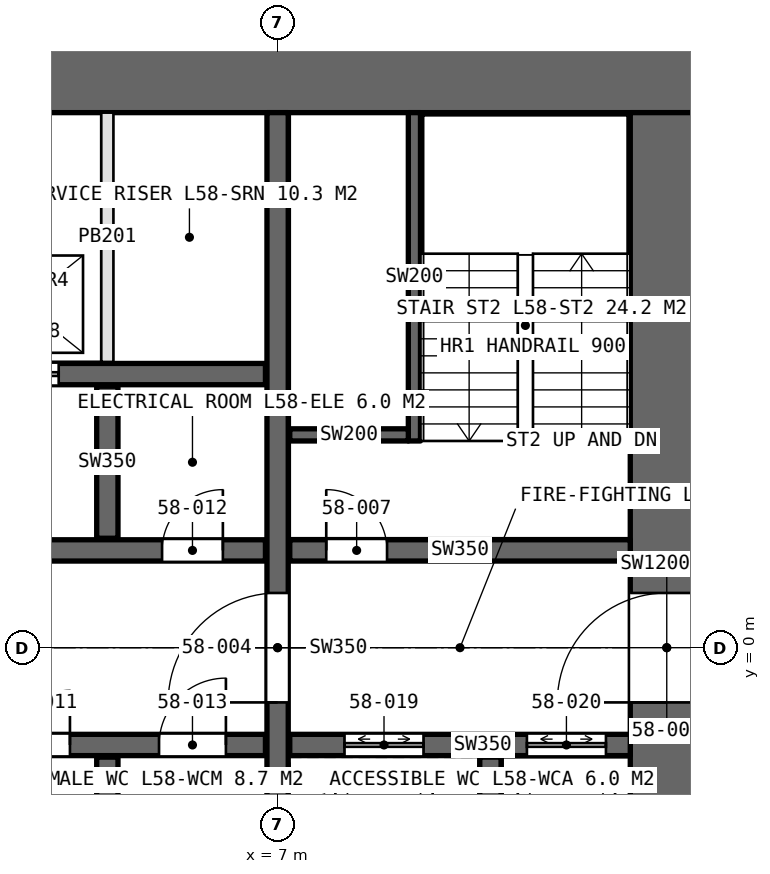
"""IFC4 building model, lengths in metres.
Left out: names, types, materials, properties, quantities, classifications, styles, units other than length and angle.
Written with IfcOpenShell. Run it as: python <this file> out.ifc"""

import sys

from ifc_helpers import new_model, si_unit, direction, frame, frame_2d, origin, place, context, subcontext, project, spatial, rectangle, extrude, element, fill, save


model = new_model("IFC4")
c1 = context("Model", 3, precision=1e-05, world=origin(), true_north=direction((0.0, 1.0)))
c2 = subcontext(c1, "Body", "Model", "MODEL_VIEW")
j1 = project(units=[si_unit("LENGTHUNIT", "METRE"), si_unit("PLANEANGLEUNIT", "RADIAN")], contexts=[c1])
p1 = place(None, origin())
s1 = spatial("IfcSite", under=j1, at=p1, CompositionType="ELEMENT")
p2 = place(p1, origin())
s2 = spatial("IfcBuilding", under=s1, at=p2, CompositionType="ELEMENT")
p3 = place(p2, frame((0.0, 0.0, 262.0)))
s3 = spatial("IfcBuildingStorey", under=s2, at=p3, CompositionType="ELEMENT", Elevation=262.0)
p4 = place(p3, frame((14.0, 9.4, 0.0), z_axis=(0.0, 0.0, 1.0), x_axis=(-1.0, 0.0, 0.0)))
e1 = element("IfcWall", 1, at=p4, inside=s3, PredefinedType="SHEAR", context=c2, shape_type="SweptSolid", body=[
    extrude(rectangle(XDim=28.0, YDim=1.2, at=frame_2d((14.0, 0.0))), origin(), (0.0, 0.0, 1.0), 4.2),
])
p5 = place(p4, frame((24.0, 0.0, 0.0)))
e2 = element("IfcOpeningElement", 2, at=p5, cuts=e1, PredefinedType="OPENING", context=c2, shape_type="SweptSolid", body=[
    extrude(rectangle(XDim=1.0, YDim=2.4, at=frame_2d((0.5, 1.2))), frame((0.0, 0.61, 0.0), z_axis=(0.0, -1.0, 0.0), x_axis=(1.0, 0.0, 0.0)), (0.0, 0.0, 1.0), 1.22),
])
p6 = place(p3, frame((13.4, -8.8, 0.0), z_axis=(0.0, 0.0, 1.0), x_axis=(0.0, 1.0, 0.0)))
e3 = element("IfcWall", 3, at=p6, inside=s3, PredefinedType="SHEAR", context=c2, shape_type="SweptSolid", body=[
    extrude(rectangle(XDim=17.6, YDim=1.2, at=frame_2d((8.8, 0.0))), origin(), (0.0, 0.0, 1.0), 4.2),
])
p7 = place(p6, frame((7.9, 0.0, 0.0)))
e4 = element("IfcOpeningElement", 4, at=p7, cuts=e3, PredefinedType="OPENING", context=c2, shape_type="SweptSolid", body=[
    extrude(rectangle(XDim=1.8, YDim=2.4, at=frame_2d((0.9, 1.2))), frame((0.0, 0.61, 0.0), z_axis=(0.0, -1.0, 0.0), x_axis=(1.0, 0.0, 0.0)), (0.0, 0.0, 1.0), 1.22),
])
p8 = place(p3, frame((7.0, -8.8, 0.0), z_axis=(0.0, 0.0, 1.0), x_axis=(0.0, 1.0, 0.0)))
e5 = element("IfcWall", 5, at=p8, inside=s3, PredefinedType="SHEAR", context=c2, shape_type="SweptSolid", body=[
    extrude(rectangle(XDim=17.6, YDim=0.35, at=frame_2d((8.8, 0.0))), origin(), (0.0, 0.0, 1.0), 4.2),
])
p9 = place(p8, frame((7.9, 0.0, 0.0)))
e6 = element("IfcOpeningElement", 6, at=p9, cuts=e5, PredefinedType="OPENING", context=c2, shape_type="SweptSolid", body=[
    extrude(rectangle(XDim=1.8, YDim=2.4, at=frame_2d((0.9, 1.2))), frame((0.0, 0.185, 0.0), z_axis=(0.0, -1.0, 0.0), x_axis=(1.0, 0.0, 0.0)), (0.0, 0.0, 1.0), 0.37),
])
p10 = place(p3, frame((-6.8, 1.6, 0.0), z_axis=(0.0, 0.0, 1.0), x_axis=(1.0, 0.0, 0.0)))
e7 = element("IfcWall", 7, at=p10, inside=s3, PredefinedType="SHEAR", context=c2, shape_type="SweptSolid", body=[
    extrude(rectangle(XDim=13.6, YDim=0.35, at=frame_2d((6.8, 0.0))), origin(), (0.0, 0.0, 1.0), 4.2),
])
p11 = place(p10, frame((11.9, 0.0, 0.0)))
e8 = element("IfcOpeningElement", 8, at=p11, cuts=e7, PredefinedType="OPENING", context=c2, shape_type="SweptSolid", body=[
    extrude(rectangle(XDim=1.0, YDim=2.4, at=frame_2d((0.5, 1.2))), frame((0.0, 0.185, 0.0), z_axis=(0.0, -1.0, 0.0), x_axis=(1.0, 0.0, 0.0)), (0.0, 0.0, 1.0), 0.37),
])
p12 = place(p10, frame((4.5, 0.0, 0.0)))
e9 = element("IfcOpeningElement", 9, at=p12, cuts=e7, PredefinedType="OPENING", context=c2, shape_type="SweptSolid", body=[
    extrude(rectangle(XDim=1.8, YDim=2.4, at=frame_2d((0.9, 1.2))), frame((0.0, 0.185, 0.0), z_axis=(0.0, -1.0, 0.0), x_axis=(1.0, 0.0, 0.0)), (0.0, 0.0, 1.0), 0.37),
])
p13 = place(p3, frame((-6.8, -1.6, 0.0), z_axis=(0.0, 0.0, 1.0), x_axis=(1.0, 0.0, 0.0)))
e10 = element("IfcWall", 10, at=p13, inside=s3, PredefinedType="SHEAR", context=c2, shape_type="SweptSolid", body=[
    extrude(rectangle(XDim=13.6, YDim=0.35, at=frame_2d((6.8, 0.0))), origin(), (0.0, 0.0, 1.0), 4.2),
])
p14 = place(p13, frame((0.365, 0.0, 0.0)))
e11 = element("IfcOpeningElement", 11, at=p14, cuts=e10, PredefinedType="OPENING", context=c2, shape_type="SweptSolid", body=[
    extrude(rectangle(XDim=1.0, YDim=2.4, at=frame_2d((0.5, 1.2))), frame((0.0, 0.185, 0.0), z_axis=(0.0, -1.0, 0.0), x_axis=(1.0, 0.0, 0.0)), (0.0, 0.0, 1.0), 0.37),
])
p15 = place(p13, frame((3.1, 0.0, 0.0)))
e12 = element("IfcOpeningElement", 12, at=p15, cuts=e10, PredefinedType="OPENING", context=c2, shape_type="SweptSolid", body=[
    extrude(rectangle(XDim=1.0, YDim=2.4, at=frame_2d((0.5, 1.2))), frame((0.0, 0.185, 0.0), z_axis=(0.0, -1.0, 0.0), x_axis=(1.0, 0.0, 0.0)), (0.0, 0.0, 1.0), 0.37),
])
p16 = place(p13, frame((6.7, 0.0, 0.0)))
e13 = element("IfcOpeningElement", 13, at=p16, cuts=e10, PredefinedType="OPENING", context=c2, shape_type="SweptSolid", body=[
    extrude(rectangle(XDim=1.0, YDim=2.4, at=frame_2d((0.5, 1.2))), frame((0.0, 0.185, 0.0), z_axis=(0.0, -1.0, 0.0), x_axis=(1.0, 0.0, 0.0)), (0.0, 0.0, 1.0), 0.37),
])
p17 = place(p13, frame((9.485, 0.0, 0.0)))
e14 = element("IfcOpeningElement", 14, at=p17, cuts=e10, PredefinedType="OPENING", context=c2, shape_type="SweptSolid", body=[
    extrude(rectangle(XDim=0.9, YDim=2.4, at=frame_2d((0.45, 1.2))), frame((0.0, 0.185, 0.0), z_axis=(0.0, -1.0, 0.0), x_axis=(1.0, 0.0, 0.0)), (0.0, 0.0, 1.0), 0.37),
])
p18 = place(p13, frame((11.85, 0.0, 0.0)))
e15 = element("IfcOpeningElement", 15, at=p18, cuts=e10, PredefinedType="OPENING", context=c2, shape_type="SweptSolid", body=[
    extrude(rectangle(XDim=1.1, YDim=2.4, at=frame_2d((0.55, 1.2))), frame((0.0, 0.185, 0.0), z_axis=(0.0, -1.0, 0.0), x_axis=(1.0, 0.0, 0.0)), (0.0, 0.0, 1.0), 0.37),
])
p19 = place(p3, frame((-6.8, 4.5, 0.0), z_axis=(0.0, 0.0, 1.0), x_axis=(1.0, 0.0, 0.0)))
e16 = element("IfcWall", 16, at=p19, inside=s3, PredefinedType="SHEAR", context=c2, shape_type="SweptSolid", body=[
    extrude(rectangle(XDim=13.6, YDim=0.35, at=frame_2d((6.8, 0.0))), origin(), (0.0, 0.0, 1.0), 4.2),
])
p20 = place(p19, frame((0.7, 0.0, 0.0)))
e17 = element("IfcOpeningElement", 17, at=p20, cuts=e16, PredefinedType="OPENING", context=c2, shape_type="SweptSolid", body=[
    extrude(rectangle(XDim=1.1, YDim=2.4, at=frame_2d((0.55, 1.2))), frame((0.0, 0.185, 0.0), z_axis=(0.0, -1.0, 0.0), x_axis=(1.0, 0.0, 0.0)), (0.0, 0.0, 1.0), 0.37),
])
p21 = place(p19, frame((3.5, 0.0, 0.0)))
e18 = element("IfcOpeningElement", 18, at=p21, cuts=e16, PredefinedType="OPENING", context=c2, shape_type="SweptSolid", body=[
    extrude(rectangle(XDim=1.1, YDim=2.4, at=frame_2d((0.55, 1.2))), frame((0.0, 0.185, 0.0), z_axis=(0.0, -1.0, 0.0), x_axis=(1.0, 0.0, 0.0)), (0.0, 0.0, 1.0), 0.37),
])
p22 = place(p19, frame((6.3, 0.0, 0.0)))
e19 = element("IfcOpeningElement", 19, at=p22, cuts=e16, PredefinedType="OPENING", context=c2, shape_type="SweptSolid", body=[
    extrude(rectangle(XDim=1.1, YDim=2.4, at=frame_2d((0.55, 1.2))), frame((0.0, 0.185, 0.0), z_axis=(0.0, -1.0, 0.0), x_axis=(1.0, 0.0, 0.0)), (0.0, 0.0, 1.0), 0.37),
])
p23 = place(p19, frame((9.1, 0.0, 0.0)))
e20 = element("IfcOpeningElement", 20, at=p23, cuts=e16, PredefinedType="OPENING", context=c2, shape_type="SweptSolid", body=[
    extrude(rectangle(XDim=1.1, YDim=2.4, at=frame_2d((0.55, 1.2))), frame((0.0, 0.185, 0.0), z_axis=(0.0, -1.0, 0.0), x_axis=(1.0, 0.0, 0.0)), (0.0, 0.0, 1.0), 0.37),
])
p24 = place(p3, frame((7.2, 1.6, 0.0), z_axis=(0.0, 0.0, 1.0), x_axis=(1.0, 0.0, 0.0)))
e21 = element("IfcWall", 21, at=p24, inside=s3, PredefinedType="SHEAR", context=c2, shape_type="SweptSolid", body=[
    extrude(rectangle(XDim=5.6, YDim=0.35, at=frame_2d((2.8, 0.0))), origin(), (0.0, 0.0, 1.0), 4.2),
])
p25 = place(p24, frame((0.6, 0.0, 0.0)))
e22 = element("IfcOpeningElement", 22, at=p25, cuts=e21, PredefinedType="OPENING", context=c2, shape_type="SweptSolid", body=[
    extrude(rectangle(XDim=1.0, YDim=2.4, at=frame_2d((0.5, 1.2))), frame((0.0, 0.185, 0.0), z_axis=(0.0, -1.0, 0.0), x_axis=(1.0, 0.0, 0.0)), (0.0, 0.0, 1.0), 0.37),
])
p26 = place(p3, frame((7.2, -1.6, 0.0), z_axis=(0.0, 0.0, 1.0), x_axis=(1.0, 0.0, 0.0)))
e23 = element("IfcWall", 23, at=p26, inside=s3, PredefinedType="SHEAR", context=c2, shape_type="SweptSolid", body=[
    extrude(rectangle(XDim=5.6, YDim=0.35, at=frame_2d((2.8, 0.0))), origin(), (0.0, 0.0, 1.0), 4.2),
])
p27 = place(p26, frame((0.9, 0.0, 0.0)))
e24 = element("IfcOpeningElement", 24, at=p27, cuts=e23, PredefinedType="OPENING", context=c2, shape_type="SweptSolid", body=[
    extrude(rectangle(XDim=1.3, YDim=2.4, at=frame_2d((0.65, 1.2))), frame((0.0, 0.185, 0.0), z_axis=(0.0, -1.0, 0.0), x_axis=(1.0, 0.0, 0.0)), (0.0, 0.0, 1.0), 0.37),
])
p28 = place(p26, frame((3.9, 0.0, 0.0)))
e25 = element("IfcOpeningElement", 25, at=p28, cuts=e23, PredefinedType="OPENING", context=c2, shape_type="SweptSolid", body=[
    extrude(rectangle(XDim=1.3, YDim=2.4, at=frame_2d((0.65, 1.2))), frame((0.0, 0.185, 0.0), z_axis=(0.0, -1.0, 0.0), x_axis=(1.0, 0.0, 0.0)), (0.0, 0.0, 1.0), 0.37),
])
p29 = place(p3, frame((10.5, -4.8, 0.0), z_axis=(0.0, 0.0, 1.0), x_axis=(0.0, 1.0, 0.0)))
e26 = element("IfcWall", 26, at=p29, inside=s3, PredefinedType="SHEAR", context=c2, shape_type="SweptSolid", body=[
    extrude(rectangle(XDim=3.0, YDim=0.35, at=frame_2d((1.5, 0.0))), origin(), (0.0, 0.0, 1.0), 4.2),
])
for number, where, z_axis, x_axis in (
    (27, (4.2, 1.8, 0.0), (0.0, 0.0, 1.0), (0.0, 1.0, 0.0)),
    (28, (4.2, -4.3, 0.0), (0.0, 0.0, 1.0), (0.0, 1.0, 0.0)),
):
    element("IfcWall", number, at=place(p3, frame(where, z_axis=z_axis, x_axis=x_axis)), inside=s3, PredefinedType="SHEAR", context=c2, shape_type="SweptSolid", body=[
        extrude(rectangle(XDim=2.5, YDim=0.35, at=frame_2d((1.25, 0.0))), origin(), (0.0, 0.0, 1.0), 4.2),
    ])
p30 = place(p3, frame((4.2, 4.7, 0.0), z_axis=(0.0, 0.0, 1.0), x_axis=(0.0, 1.0, 0.0)))
e29 = element("IfcWall", 29, at=p30, inside=s3, PredefinedType="PARTITIONING", context=c2, shape_type="SweptSolid", body=[
    extrude(rectangle(XDim=4.1, YDim=0.2, at=frame_2d((2.05, 0.0))), origin(), (0.0, 0.0, 1.0), 4.2),
])
p31 = place(p3, frame((9.25, 3.4, 0.0), z_axis=(0.0, 0.0, 1.0), x_axis=(0.0, 1.0, 0.0)))
e30 = element("IfcWall", 30, at=p31, inside=s3, PredefinedType="SOLIDWALL", context=c2, shape_type="SweptSolid", body=[
    extrude(rectangle(XDim=5.4, YDim=0.2, at=frame_2d((2.7, 0.0))), origin(), (0.0, 0.0, 1.0), 4.2),
])
p32 = place(p3, frame((9.15, 3.5, 0.0), z_axis=(0.0, 0.0, 1.0), x_axis=(-1.0, 0.0, 0.0)))
e31 = element("IfcWall", 31, at=p32, inside=s3, PredefinedType="SOLIDWALL", context=c2, shape_type="SweptSolid", body=[
    extrude(rectangle(XDim=1.95, YDim=0.2, at=frame_2d((0.975, 0.0))), origin(), (0.0, 0.0, 1.0), 4.2),
])
p33 = place(p7, origin())
e32 = element("IfcDoor", 32, at=p33, inside=s3, OperationType="DOUBLE_DOOR_SINGLE_SWING", PredefinedType="DOOR", context=c2, shape_type="SweptSolid", body=[
    extrude(rectangle(XDim=1.8, YDim=2.4, at=frame_2d((0.9, 1.2))), frame((0.0, 0.025, 0.0), z_axis=(0.0, -1.0, 0.0), x_axis=(1.0, 0.0, 0.0)), (0.0, 0.0, 1.0), 0.05),
])
fill(e4, e32)
p34 = place(p9, origin())
e33 = element("IfcDoor", 33, at=p34, inside=s3, OperationType="DOUBLE_DOOR_SINGLE_SWING", PredefinedType="DOOR", context=c2, shape_type="SweptSolid", body=[
    extrude(rectangle(XDim=1.8, YDim=2.4, at=frame_2d((0.9, 1.2))), frame((0.0, 0.025, 0.0), z_axis=(0.0, -1.0, 0.0), x_axis=(1.0, 0.0, 0.0)), (0.0, 0.0, 1.0), 0.05),
])
fill(e6, e33)
p35 = place(p25, origin())
e34 = element("IfcDoor", 34, at=p35, inside=s3, OperationType="SINGLE_SWING_LEFT", PredefinedType="DOOR", context=c2, shape_type="SweptSolid", body=[
    extrude(rectangle(XDim=1.0, YDim=2.4, at=frame_2d((0.5, 1.2))), frame((0.0, 0.025, 0.0), z_axis=(0.0, -1.0, 0.0), x_axis=(1.0, 0.0, 0.0)), (0.0, 0.0, 1.0), 0.05),
])
fill(e22, e34)
p36 = place(p17, origin())
e35 = element("IfcDoor", 35, at=p36, inside=s3, OperationType="SINGLE_SWING_RIGHT", PredefinedType="DOOR", context=c2, shape_type="SweptSolid", body=[
    extrude(rectangle(XDim=0.9, YDim=2.4, at=frame_2d((0.45, 1.2))), frame((0.0, 0.025, 0.0), z_axis=(0.0, -1.0, 0.0), x_axis=(1.0, 0.0, 0.0)), (0.0, 0.0, 1.0), 0.05),
])
fill(e14, e35)
p37 = place(p11, origin())
e36 = element("IfcDoor", 36, at=p37, inside=s3, OperationType="SINGLE_SWING_RIGHT", PredefinedType="DOOR", context=c2, shape_type="SweptSolid", body=[
    extrude(rectangle(XDim=1.0, YDim=2.4, at=frame_2d((0.5, 1.2))), frame((0.0, 0.025, 0.0), z_axis=(0.0, -1.0, 0.0), x_axis=(1.0, 0.0, 0.0)), (0.0, 0.0, 1.0), 0.05),
])
fill(e8, e36)
p38 = place(p18, origin())
e37 = element("IfcDoor", 37, at=p38, inside=s3, OperationType="SINGLE_SWING_RIGHT", PredefinedType="DOOR", context=c2, shape_type="SweptSolid", body=[
    extrude(rectangle(XDim=1.1, YDim=2.4, at=frame_2d((0.55, 1.2))), frame((0.0, 0.025, 0.0), z_axis=(0.0, -1.0, 0.0), x_axis=(1.0, 0.0, 0.0)), (0.0, 0.0, 1.0), 0.05),
])
fill(e15, e37)
p39 = place(p23, origin())
e38 = element("IfcDoor", 38, at=p39, inside=s3, OperationType="DOUBLE_DOOR_SLIDING", PredefinedType="DOOR", context=c2, shape_type="SweptSolid", body=[
    extrude(rectangle(XDim=1.1, YDim=2.4, at=frame_2d((0.55, 1.2))), frame((0.0, 0.025, 0.0), z_axis=(0.0, -1.0, 0.0), x_axis=(1.0, 0.0, 0.0)), (0.0, 0.0, 1.0), 0.05),
])
fill(e20, e38)
p40 = place(p27, origin())
e39 = element("IfcDoor", 39, at=p40, inside=s3, OperationType="DOUBLE_DOOR_SLIDING", PredefinedType="DOOR", context=c2, shape_type="SweptSolid", body=[
    extrude(rectangle(XDim=1.3, YDim=2.4, at=frame_2d((0.65, 1.2))), frame((0.0, 0.025, 0.0), z_axis=(0.0, -1.0, 0.0), x_axis=(1.0, 0.0, 0.0)), (0.0, 0.0, 1.0), 0.05),
])
fill(e24, e39)
p41 = place(p28, origin())
e40 = element("IfcDoor", 40, at=p41, inside=s3, OperationType="DOUBLE_DOOR_SLIDING", PredefinedType="DOOR", context=c2, shape_type="SweptSolid", body=[
    extrude(rectangle(XDim=1.3, YDim=2.4, at=frame_2d((0.65, 1.2))), frame((0.0, 0.025, 0.0), z_axis=(0.0, -1.0, 0.0), x_axis=(1.0, 0.0, 0.0)), (0.0, 0.0, 1.0), 0.05),
])
fill(e25, e40)
save(model, sys.argv[1])
